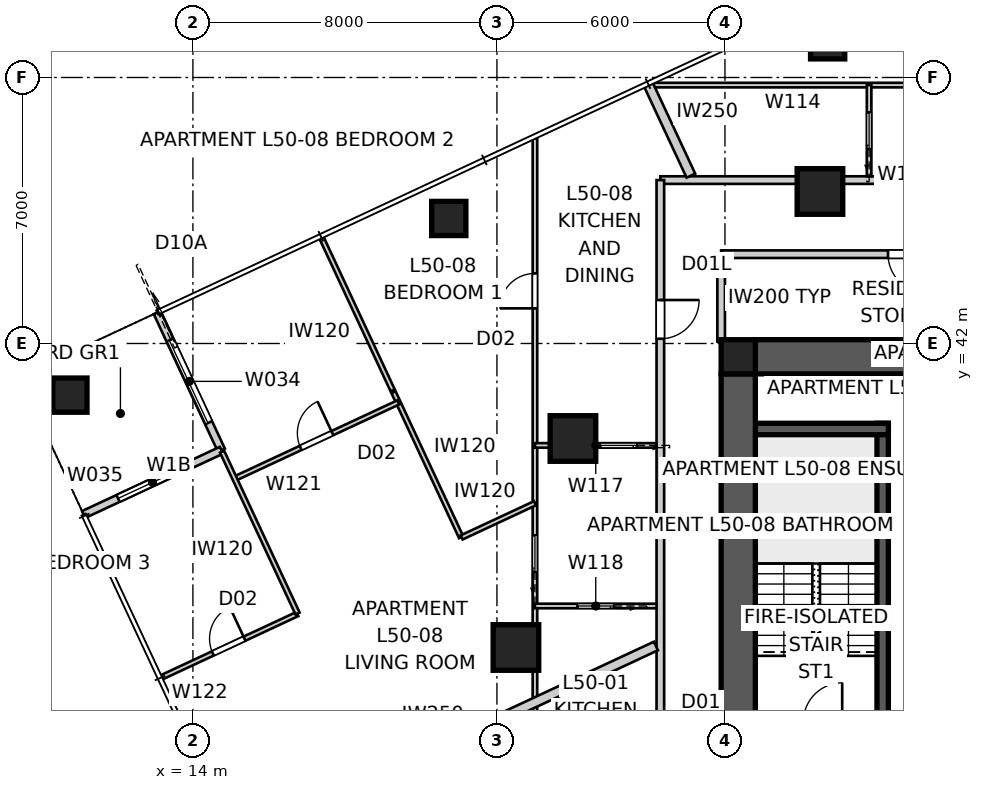
"""IFC4 building model, lengths in metres.
Left out: names, types, materials, properties, quantities, classifications, styles, units other than length and angle.
Written with IfcOpenShell. Run it as: python <this file> out.ifc"""

import sys

from ifc_helpers import new_model, si_unit, direction, frame, frame_2d, origin, origin_2d, place, context, subcontext, project, spatial, polyline, rectangle, outline, extrude, element, fill, save


model = new_model("IFC4")
c1 = context("Model", 3, precision=1e-05, world=origin(), true_north=direction((0.0, 1.0)))
c2 = subcontext(c1, "Body", "Model", "MODEL_VIEW")
j1 = project(units=[si_unit("LENGTHUNIT", "METRE"), si_unit("PLANEANGLEUNIT", "RADIAN")], contexts=[c1])
p1 = place(None, origin())
s1 = spatial("IfcSite", under=j1, at=p1, CompositionType="ELEMENT")
p2 = place(p1, origin())
s2 = spatial("IfcBuilding", under=s1, at=p2, CompositionType="ELEMENT")
p3 = place(p2, frame((0.0, 0.0, 182.8)))
s3 = spatial("IfcBuildingStorey", under=s2, at=p3, CompositionType="ELEMENT", Elevation=182.8)
p4 = place(p3, frame((28.8, 41.65, 0.0), z_axis=(0.0, 0.0, 1.0), x_axis=(1.0, 0.0, 0.0)))
e1 = element("IfcWall", 1, at=p4, inside=s3, PredefinedType="SHEAR", context=c2, shape_type="SweptSolid", body=[
    extrude(outline(polyline([(0.0, -0.45), (22.4, -0.45), (22.4, -0.025), (22.85, -0.025), (22.85, 0.025), (22.4, 0.025), (22.4, 0.45), (0.0, 0.45), (0.0, 0.025), (-0.45, 0.025), (-0.45, -0.025), (0.0, -0.025), (0.0, -0.45)])), origin(), (0.0, 0.0, 1.0), 3.4),
])
p5 = place(p3, frame((28.35, 41.2, 0.0), z_axis=(0.0, 0.0, 1.0), x_axis=(0.0, -1.0, 0.0)))
e2 = element("IfcWall", 2, at=p5, inside=s3, PredefinedType="SHEAR", context=c2, shape_type="SweptSolid", body=[
    extrude(outline(polyline([(0.0, -0.45), (22.4, -0.45), (22.4, -0.025), (22.85, -0.025), (22.85, 0.025), (22.4, 0.025), (22.4, 0.45), (0.0, 0.45), (0.0, 0.025), (-0.45, 0.025), (-0.45, -0.025), (0.0, -0.025), (0.0, -0.45)])), origin(), (0.0, 0.0, 1.0), 3.4),
])
p6 = place(p5, frame((11.14, 0.0, 0.0)))
e3 = element("IfcOpeningElement", 3, at=p6, cuts=e2, PredefinedType="OPENING", context=c2, shape_type="SweptSolid", body=[
    extrude(rectangle(XDim=1.02, YDim=2.4, at=frame_2d((0.51, 1.2))), frame((0.0, 0.46, 0.0), z_axis=(0.0, -1.0, 0.0), x_axis=(1.0, 0.0, 0.0)), (0.0, 0.0, 1.0), 0.92),
])
p7 = place(p3, frame((32.15, 32.2, 0.0), z_axis=(0.0, 0.0, 1.0), x_axis=(0.0, 1.0, 0.0)))
e4 = element("IfcWall", 4, at=p7, inside=s3, PredefinedType="SHEAR", context=c2, shape_type="SweptSolid", body=[
    extrude(rectangle(XDim=7.7, YDim=0.3, at=frame_2d((3.85, 0.0))), origin(), (0.0, 0.0, 1.0), 3.4),
])
p8 = place(p3, frame((28.8, 39.75, 0.0), z_axis=(0.0, 0.0, 1.0), x_axis=(1.0, 0.0, 0.0)))
e5 = element("IfcWall", 5, at=p8, inside=s3, PredefinedType="SHEAR", context=c2, shape_type="SweptSolid", body=[
    extrude(rectangle(XDim=3.5, YDim=0.3, at=frame_2d((1.75, 0.0))), origin(), (0.0, 0.0, 1.0), 3.4),
])
for number, where, z_axis, x_axis in (
    (6, (28.35, 41.65, 0.0), (0.0, 0.0, 1.0), (1.0, 0.0, 0.0)),
    (7, (30.702, 49.939, 0.0), (0.0, 0.0, 1.0), (1.0, 0.0, 0.0)),
    (8, (20.733, 45.29, 0.0), (0.0, 0.0, 1.0), (1.0, 0.0, 0.0)),
    (9, (10.764, 40.641, 0.0), (0.0, 0.0, 1.0), (1.0, 0.0, 0.0)),
):
    element("IfcColumn", number, at=place(p3, frame(where, z_axis=z_axis, x_axis=x_axis)), inside=s3, PredefinedType="COLUMN", context=c2, shape_type="SweptSolid", body=[
        extrude(rectangle(XDim=0.9, YDim=0.9, at=origin_2d()), origin(), (0.0, 0.0, 1.0), 3.4),
    ])
for number, where, z_axis, x_axis in (
    (10, (30.5, 46.0, 0.0), (0.0, 0.0, 1.0), (1.0, 0.0, 0.0)),
    (11, (24.0, 39.5, 0.0), (0.0, 0.0, 1.0), (1.0, 0.0, 0.0)),
    (12, (22.5, 34.0, 0.0), (0.0, 0.0, 1.0), (1.0, 0.0, 0.0)),
):
    element("IfcColumn", number, at=place(p3, frame(where, z_axis=z_axis, x_axis=x_axis)), inside=s3, PredefinedType="COLUMN", context=c2, shape_type="SweptSolid", body=[
        extrude(rectangle(XDim=1.2, YDim=1.2, at=origin_2d()), origin(), (0.0, 0.0, 1.0), 3.4),
    ])
p9 = place(p3, frame((13.06, 42.815, 0.0), z_axis=(0.0, 0.0, 1.0), x_axis=(0.422658246362, -0.906289140828, 0.0)))
e13 = element("IfcWall", 13, at=p9, inside=s3, PredefinedType="SOLIDWALL", context=c2, shape_type="SweptSolid", body=[
    extrude(rectangle(XDim=4.0, YDim=0.2, at=frame_2d((2.0, 0.0))), origin(), (0.0, 0.0, 1.0), 3.25),
])
p10 = place(p9, frame((0.8, 0.0, 0.0)))
e14 = element("IfcOpeningElement", 14, at=p10, cuts=e13, PredefinedType="OPENING", context=c2, shape_type="SweptSolid", body=[
    extrude(rectangle(XDim=2.4, YDim=2.1, at=frame_2d((1.2, 1.05))), frame((0.0, 0.11, 0.0), z_axis=(0.0, -1.0, 0.0), x_axis=(1.0, 0.0, 0.0)), (0.0, 0.0, 1.0), 0.22),
])
p11 = place(p3, frame((14.75, 39.19, 0.0), z_axis=(0.0, 0.0, 1.0), x_axis=(-0.906289140828, -0.422658246362, 0.0)))
e15 = element("IfcWall", 15, at=p11, inside=s3, PredefinedType="SOLIDWALL", context=c2, shape_type="SweptSolid", body=[
    extrude(rectangle(XDim=4.0, YDim=0.2, at=frame_2d((2.0, 0.0))), origin(), (0.0, 0.0, 1.0), 3.25),
])
p12 = place(p11, frame((1.0, 0.0, 0.45)))
e16 = element("IfcOpeningElement", 16, at=p12, cuts=e15, PredefinedType="OPENING", context=c2, shape_type="SweptSolid", body=[
    extrude(rectangle(XDim=2.0, YDim=1.8, at=frame_2d((1.0, 0.9))), frame((0.0, 0.11, 0.0), z_axis=(0.0, -1.0, 0.0), x_axis=(1.0, 0.0, 0.0)), (0.0, 0.0, 1.0), 0.22),
])
p13 = place(p3, frame((47.558, 46.3, 0.0), z_axis=(0.0, 0.0, 1.0), x_axis=(-1.0, 0.0, 0.0)))
e17 = element("IfcWall", 17, at=p13, inside=s3, PredefinedType="PARTITIONING", context=c2, shape_type="SweptSolid", body=[
    extrude(rectangle(XDim=15.117, YDim=0.2, at=frame_2d((7.558, 0.0))), origin(), (0.0, 0.0, 1.0), 3.25),
])
p14 = place(p13, frame((12.295, 0.0, 0.0)))
e18 = element("IfcOpeningElement", 18, at=p14, cuts=e17, PredefinedType="OPENING", context=c2, shape_type="SweptSolid", body=[
    extrude(rectangle(XDim=1.02, YDim=2.34, at=frame_2d((0.51, 1.17))), frame((0.0, 0.11, 0.0), z_axis=(0.0, -1.0, 0.0), x_axis=(1.0, 0.0, 0.0)), (0.0, 0.0, 1.0), 0.22),
])
p15 = place(p3, frame((32.442, 46.3, 0.0), z_axis=(0.0, 0.0, 1.0), x_axis=(-1.0, 0.0, 0.0)))
e19 = element("IfcWall", 19, at=p15, inside=s3, PredefinedType="PARTITIONING", context=c2, shape_type="SweptSolid", body=[
    extrude(rectangle(XDim=1.683, YDim=0.2, at=frame_2d((0.842, 0.0))), origin(), (0.0, 0.0, 1.0), 2.55),
])
p16 = place(p3, frame((30.758, 46.3, 0.0), z_axis=(0.0, 0.0, 1.0), x_axis=(-1.0, 0.0, 0.0)))
e20 = element("IfcWall", 20, at=p16, inside=s3, PredefinedType="PARTITIONING", context=c2, shape_type="SweptSolid", body=[
    extrude(rectangle(XDim=4.458, YDim=0.2, at=frame_2d((2.229, 0.0))), origin(), (0.0, 0.0, 1.0), 3.25),
])
p17 = place(p3, frame((26.3, 46.3, 0.0), z_axis=(0.0, 0.0, 1.0), x_axis=(0.0, -1.0, 0.0)))
e21 = element("IfcWall", 21, at=p17, inside=s3, PredefinedType="PARTITIONING", context=c2, shape_type="SweptSolid", body=[
    extrude(rectangle(XDim=32.6, YDim=0.2, at=frame_2d((16.3, 0.0))), origin(), (0.0, 0.0, 1.0), 3.25),
])
p18 = place(p17, frame((3.156, 0.0, 0.0)))
e22 = element("IfcOpeningElement", 22, at=p18, cuts=e21, PredefinedType="OPENING", context=c2, shape_type="SweptSolid", body=[
    extrude(rectangle(XDim=1.02, YDim=2.1, at=frame_2d((0.51, 1.05))), frame((0.0, 0.11, 0.0), z_axis=(0.0, -1.0, 0.0), x_axis=(1.0, 0.0, 0.0)), (0.0, 0.0, 1.0), 0.22),
])
p19 = place(p17, frame((14.68, 0.0, 0.0)))
e23 = element("IfcOpeningElement", 23, at=p19, cuts=e21, PredefinedType="OPENING", context=c2, shape_type="SweptSolid", body=[
    extrude(rectangle(XDim=1.02, YDim=2.34, at=frame_2d((0.51, 1.17))), frame((0.0, 0.11, 0.0), z_axis=(0.0, -1.0, 0.0), x_axis=(1.0, 0.0, 0.0)), (0.0, 0.0, 1.0), 0.22),
])
p20 = place(p17, frame((29.543, 0.0, 0.0)))
e24 = element("IfcOpeningElement", 24, at=p20, cuts=e21, PredefinedType="OPENING", context=c2, shape_type="SweptSolid", body=[
    extrude(rectangle(XDim=1.02, YDim=2.34, at=frame_2d((0.51, 1.17))), frame((0.0, 0.11, 0.0), z_axis=(0.0, -1.0, 0.0), x_axis=(1.0, 0.0, 0.0)), (0.0, 0.0, 1.0), 0.22),
])
p21 = place(p3, frame((25.975, 48.838, 0.0), z_axis=(0.0, 0.0, 1.0), x_axis=(0.422590257842, -0.906320844943, 0.0)))
e25 = element("IfcWall", 25, at=p21, inside=s3, PredefinedType="PARTITIONING", context=c2, shape_type="SweptSolid", body=[
    extrude(rectangle(XDim=2.671, YDim=0.25, at=frame_2d((1.336, 0.0))), origin(), (0.0, 0.0, 1.0), 3.25),
])
p22 = place(p3, frame((15.14, 28.89, 0.0), z_axis=(0.0, 0.0, 1.0), x_axis=(0.906303906082, 0.422626584374, 0.0)))
e26 = element("IfcWall", 26, at=p22, inside=s3, PredefinedType="PARTITIONING", context=c2, shape_type="SweptSolid", body=[
    extrude(rectangle(XDim=12.185, YDim=0.25, at=frame_2d((6.092, 0.0))), origin(), (0.0, 0.0, 1.0), 3.25),
])
p23 = place(p3, frame((52.1, 44.35, 0.0), z_axis=(0.0, 0.0, 1.0), x_axis=(-1.0, 0.0, 0.0)))
e27 = element("IfcWall", 27, at=p23, inside=s3, PredefinedType="PARTITIONING", context=c2, shape_type="SweptSolid", body=[
    extrude(rectangle(XDim=24.2, YDim=0.2, at=frame_2d((12.1, 0.0))), origin(), (0.0, 0.0, 1.0), 3.25),
])
p24 = place(p23, frame((18.789, 0.0, 0.0)))
e28 = element("IfcOpeningElement", 28, at=p24, cuts=e27, PredefinedType="OPENING", context=c2, shape_type="SweptSolid", body=[
    extrude(rectangle(XDim=1.02, YDim=2.1, at=frame_2d((0.51, 1.05))), frame((0.0, 0.11, 0.0), z_axis=(0.0, -1.0, 0.0), x_axis=(1.0, 0.0, 0.0)), (0.0, 0.0, 1.0), 0.22),
])
p25 = place(p23, frame((4.391, 0.0, 0.0)))
e29 = element("IfcOpeningElement", 29, at=p25, cuts=e27, PredefinedType="OPENING", context=c2, shape_type="SweptSolid", body=[
    extrude(rectangle(XDim=1.02, YDim=2.1, at=frame_2d((0.51, 1.05))), frame((0.0, 0.11, 0.0), z_axis=(0.0, -1.0, 0.0), x_axis=(1.0, 0.0, 0.0)), (0.0, 0.0, 1.0), 0.22),
])
p26 = place(p23, frame((11.59, 0.0, 0.0)))
e30 = element("IfcOpeningElement", 30, at=p26, cuts=e27, PredefinedType="OPENING", context=c2, shape_type="SweptSolid", body=[
    extrude(rectangle(XDim=1.02, YDim=2.1, at=frame_2d((0.51, 1.05))), frame((0.0, 0.11, 0.0), z_axis=(0.0, -1.0, 0.0), x_axis=(1.0, 0.0, 0.0)), (0.0, 0.0, 1.0), 0.22),
])
p27 = place(p3, frame((27.9, 44.35, 0.0), z_axis=(0.0, 0.0, 1.0), x_axis=(0.0, -1.0, 0.0)))
e31 = element("IfcWall", 31, at=p27, inside=s3, PredefinedType="PARTITIONING", context=c2, shape_type="SweptSolid", body=[
    extrude(rectangle(XDim=2.3, YDim=0.2, at=frame_2d((1.15, 0.0))), origin(), (0.0, 0.0, 1.0), 3.25),
])
p28 = place(p3, frame((23.0, 16.832, 0.0), z_axis=(0.0, 0.0, 1.0), x_axis=(0.0, 1.0, 0.0)))
e32 = element("IfcWall", 32, at=p28, inside=s3, PredefinedType="PARTITIONING", context=c2, shape_type="SweptSolid", body=[
    extrude(rectangle(XDim=30.574, YDim=0.12, at=frame_2d((15.287, 0.0))), origin(), (0.0, 0.0, 1.0), 2.55),
])
p29 = place(p28, frame((26.093, 0.0, 0.0)))
e33 = element("IfcOpeningElement", 33, at=p29, cuts=e32, PredefinedType="OPENING", context=c2, shape_type="SweptSolid", body=[
    extrude(rectangle(XDim=0.92, YDim=2.34, at=frame_2d((0.46, 1.17))), frame((0.0, 0.07, 0.0), z_axis=(0.0, -1.0, 0.0), x_axis=(1.0, 0.0, 0.0)), (0.0, 0.0, 1.0), 0.14),
])
p30 = place(p28, frame((13.012, 0.0, 0.0)))
e34 = element("IfcOpeningElement", 34, at=p30, cuts=e32, PredefinedType="OPENING", context=c2, shape_type="SweptSolid", body=[
    extrude(rectangle(XDim=0.92, YDim=2.34, at=frame_2d((0.46, 1.17))), frame((0.0, 0.07, 0.0), z_axis=(0.0, -1.0, 0.0), x_axis=(1.0, 0.0, 0.0)), (0.0, 0.0, 1.0), 0.14),
])
p31 = place(p28, frame((19.16, 0.0, 0.0)))
e35 = element("IfcOpeningElement", 35, at=p31, cuts=e32, PredefinedType="OPENING", context=c2, shape_type="SweptSolid", body=[
    extrude(rectangle(XDim=0.96, YDim=2.1, at=frame_2d((0.48, 1.05))), frame((0.0, 0.07, 0.0), z_axis=(0.0, -1.0, 0.0), x_axis=(1.0, 0.0, 0.0)), (0.0, 0.0, 1.0), 0.14),
])
p32 = place(p28, frame((2.018, 0.0, 0.0)))
e36 = element("IfcOpeningElement", 36, at=p32, cuts=e32, PredefinedType="OPENING", context=c2, shape_type="SweptSolid", body=[
    extrude(rectangle(XDim=0.96, YDim=2.1, at=frame_2d((0.48, 1.05))), frame((0.0, 0.07, 0.0), z_axis=(0.0, -1.0, 0.0), x_axis=(1.0, 0.0, 0.0)), (0.0, 0.0, 1.0), 0.14),
])
p33 = place(p3, frame((25.993, 48.8, 0.0), z_axis=(0.0, 0.0, 1.0), x_axis=(1.0, 0.0, 0.0)))
e37 = element("IfcWall", 37, at=p33, inside=s3, PredefinedType="PARTITIONING", context=c2, shape_type="SweptSolid", body=[
    extrude(rectangle(XDim=10.272, YDim=0.12, at=frame_2d((5.136, 0.0))), origin(), (0.0, 0.0, 1.0), 3.25),
])
p34 = place(p33, frame((7.576, 0.0, 0.0)))
e38 = element("IfcOpeningElement", 38, at=p34, cuts=e37, PredefinedType="OPENING", context=c2, shape_type="SweptSolid", body=[
    extrude(rectangle(XDim=0.92, YDim=2.34, at=frame_2d((0.46, 1.17))), frame((0.0, 0.07, 0.0), z_axis=(0.0, -1.0, 0.0), x_axis=(1.0, 0.0, 0.0)), (0.0, 0.0, 1.0), 0.14),
])
p35 = place(p3, frame((31.793, 46.4, 0.0), z_axis=(0.0, 0.0, 1.0), x_axis=(0.0, 1.0, 0.0)))
e39 = element("IfcWall", 39, at=p35, inside=s3, PredefinedType="PARTITIONING", context=c2, shape_type="SweptSolid", body=[
    extrude(rectangle(XDim=2.4, YDim=0.12, at=frame_2d((1.2, 0.0))), origin(), (0.0, 0.0, 1.0), 3.25),
])
p36 = place(p35, frame((0.72, 0.0, 0.0)))
e40 = element("IfcOpeningElement", 40, at=p36, cuts=e39, PredefinedType="OPENING", context=c2, shape_type="SweptSolid", body=[
    extrude(rectangle(XDim=0.96, YDim=2.1, at=frame_2d((0.48, 1.05))), frame((0.0, 0.07, 0.0), z_axis=(0.0, -1.0, 0.0), x_axis=(1.0, 0.0, 0.0)), (0.0, 0.0, 1.0), 0.14),
])
p37 = place(p3, frame((26.2, 39.318, 0.0), z_axis=(0.0, 0.0, 1.0), x_axis=(-1.0, 0.0, 0.0)))
e41 = element("IfcWall", 41, at=p37, inside=s3, PredefinedType="PARTITIONING", context=c2, shape_type="SweptSolid", body=[
    extrude(rectangle(XDim=3.2, YDim=0.12, at=frame_2d((1.6, 0.0))), origin(), (0.0, 0.0, 1.0), 3.25),
])
p38 = place(p37, frame((0.52, 0.0, 0.0)))
e42 = element("IfcOpeningElement", 42, at=p38, cuts=e41, PredefinedType="OPENING", context=c2, shape_type="SweptSolid", body=[
    extrude(rectangle(XDim=0.96, YDim=2.1, at=frame_2d((0.48, 1.05))), frame((0.0, 0.07, 0.0), z_axis=(0.0, -1.0, 0.0), x_axis=(1.0, 0.0, 0.0)), (0.0, 0.0, 1.0), 0.14),
])
p39 = place(p3, frame((26.2, 35.092, 0.0), z_axis=(0.0, 0.0, 1.0), x_axis=(-1.0, 0.0, 0.0)))
e43 = element("IfcWall", 43, at=p39, inside=s3, PredefinedType="PARTITIONING", context=c2, shape_type="SweptSolid", body=[
    extrude(rectangle(XDim=3.2, YDim=0.12, at=frame_2d((1.6, 0.0))), origin(), (0.0, 0.0, 1.0), 3.25),
])
p40 = place(p39, frame((1.12, 0.0, 0.0)))
e44 = element("IfcOpeningElement", 44, at=p40, cuts=e43, PredefinedType="OPENING", context=c2, shape_type="SweptSolid", body=[
    extrude(rectangle(XDim=0.96, YDim=2.1, at=frame_2d((0.48, 1.05))), frame((0.0, 0.07, 0.0), z_axis=(0.0, -1.0, 0.0), x_axis=(1.0, 0.0, 0.0)), (0.0, 0.0, 1.0), 0.14),
])
p41 = place(p3, frame((19.279, 40.718, 0.0), z_axis=(0.0, 0.0, 1.0), x_axis=(0.422625167194, -0.906304566939, 0.0)))
e45 = element("IfcWall", 45, at=p41, inside=s3, PredefinedType="PARTITIONING", context=c2, shape_type="SweptSolid", body=[
    extrude(rectangle(XDim=4.211, YDim=0.12, at=frame_2d((2.105, 0.0))), origin(), (0.0, 0.0, 1.0), 3.25),
])
p42 = place(p3, frame((21.072, 36.897, 0.0), z_axis=(0.0, 0.0, 1.0), x_axis=(0.90630329877, 0.422627886727, 0.0)))
e46 = element("IfcWall", 46, at=p42, inside=s3, PredefinedType="PARTITIONING", context=c2, shape_type="SweptSolid", body=[
    extrude(rectangle(XDim=2.128, YDim=0.12, at=frame_2d((1.064, 0.0))), origin(), (0.0, 0.0, 1.0), 3.25),
])
p43 = place(p3, frame((15.099, 38.442, 0.0), z_axis=(0.0, 0.0, 1.0), x_axis=(0.906306539388, 0.422620937321, 0.0)))
e47 = element("IfcWall", 47, at=p43, inside=s3, PredefinedType="PARTITIONING", context=c2, shape_type="SweptSolid", body=[
    extrude(rectangle(XDim=4.75, YDim=0.12, at=frame_2d((2.375, 0.0))), origin(), (0.0, 0.0, 1.0), 3.25),
])
p44 = place(p43, frame((1.915, 0.0, 0.0)))
e48 = element("IfcOpeningElement", 48, at=p44, cuts=e47, PredefinedType="OPENING", context=c2, shape_type="SweptSolid", body=[
    extrude(rectangle(XDim=0.92, YDim=2.34, at=frame_2d((0.46, 1.17))), frame((0.0, 0.07, 0.0), z_axis=(0.0, -1.0, 0.0), x_axis=(1.0, 0.0, 0.0)), (0.0, 0.0, 1.0), 0.14),
])
p45 = place(p3, frame((13.169, 33.211, 0.0), z_axis=(0.0, 0.0, 1.0), x_axis=(0.9062952203, 0.422645210149, 0.0)))
e49 = element("IfcWall", 49, at=p45, inside=s3, PredefinedType="PARTITIONING", context=c2, shape_type="SweptSolid", body=[
    extrude(rectangle(XDim=3.95, YDim=0.12, at=frame_2d((1.975, 0.0))), origin(), (0.0, 0.0, 1.0), 3.25),
])
p46 = place(p45, frame((1.495, 0.0, 0.0)))
e50 = element("IfcOpeningElement", 50, at=p46, cuts=e49, PredefinedType="OPENING", context=c2, shape_type="SweptSolid", body=[
    extrude(rectangle(XDim=0.92, YDim=2.34, at=frame_2d((0.46, 1.17))), frame((0.0, 0.07, 0.0), z_axis=(0.0, -1.0, 0.0), x_axis=(1.0, 0.0, 0.0)), (0.0, 0.0, 1.0), 0.14),
])
p47 = place(p3, frame((16.754, 34.894, 0.0), z_axis=(0.0, 0.0, 1.0), x_axis=(-0.42256979057, 0.906330387937, 0.0)))
e51 = element("IfcWall", 51, at=p47, inside=s3, PredefinedType="PARTITIONING", context=c2, shape_type="SweptSolid", body=[
    extrude(rectangle(XDim=4.7, YDim=0.12, at=frame_2d((2.35, 0.0))), origin(), (0.0, 0.0, 1.0), 3.25),
])
p48 = place(p3, frame((19.256, 40.767, 0.0), z_axis=(0.0, 0.0, 1.0), x_axis=(-0.42260518136, 0.906313886403, 0.0)))
e52 = element("IfcWall", 52, at=p48, inside=s3, PredefinedType="PARTITIONING", context=c2, shape_type="SweptSolid", body=[
    extrude(rectangle(XDim=4.435, YDim=0.12, at=frame_2d((2.218, 0.0))), origin(), (0.0, 0.0, 1.0), 3.25),
])
p49 = place(p10, origin())
e53 = element("IfcDoor", 53, at=p49, inside=s3, OperationType="SLIDING_TO_LEFT", PredefinedType="DOOR", context=c2, shape_type="SweptSolid", body=[
    extrude(rectangle(XDim=2.4, YDim=2.1, at=frame_2d((1.2, 1.05))), frame((0.0, 0.025, 0.0), z_axis=(0.0, -1.0, 0.0), x_axis=(1.0, 0.0, 0.0)), (0.0, 0.0, 1.0), 0.05),
])
fill(e14, e53)
p50 = place(p12, origin())
e54 = element("IfcWindow", 54, at=p50, inside=s3, PartitioningType="SINGLE_PANEL", PredefinedType="WINDOW", context=c2, shape_type="SweptSolid", body=[
    extrude(rectangle(XDim=2.0, YDim=1.8, at=frame_2d((1.0, 0.9))), frame((0.0, 0.03, 0.0), z_axis=(0.0, -1.0, 0.0), x_axis=(1.0, 0.0, 0.0)), (0.0, 0.0, 1.0), 0.06),
])
fill(e16, e54)
p51 = place(p24, origin())
e55 = element("IfcDoor", 55, at=p51, inside=s3, OperationType="SINGLE_SWING_LEFT", PredefinedType="DOOR", context=c2, shape_type="SweptSolid", body=[
    extrude(rectangle(XDim=1.02, YDim=2.1, at=frame_2d((0.51, 1.05))), frame((0.0, 0.025, 0.0), z_axis=(0.0, -1.0, 0.0), x_axis=(1.0, 0.0, 0.0)), (0.0, 0.0, 1.0), 0.05),
])
fill(e28, e55)
p52 = place(p18, origin())
e56 = element("IfcDoor", 56, at=p52, inside=s3, OperationType="SINGLE_SWING_LEFT", PredefinedType="DOOR", context=c2, shape_type="SweptSolid", body=[
    extrude(rectangle(XDim=1.02, YDim=2.1, at=frame_2d((0.51, 1.05))), frame((0.0, 0.025, 0.0), z_axis=(0.0, -1.0, 0.0), x_axis=(1.0, 0.0, 0.0)), (0.0, 0.0, 1.0), 0.05),
])
fill(e22, e56)
p53 = place(p29, origin())
e57 = element("IfcDoor", 57, at=p53, inside=s3, OperationType="SINGLE_SWING_LEFT", PredefinedType="DOOR", context=c2, shape_type="SweptSolid", body=[
    extrude(rectangle(XDim=0.92, YDim=2.34, at=frame_2d((0.46, 1.17))), frame((0.0, 0.025, 0.0), z_axis=(0.0, -1.0, 0.0), x_axis=(1.0, 0.0, 0.0)), (0.0, 0.0, 1.0), 0.05),
])
fill(e33, e57)
p54 = place(p38, origin())
e58 = element("IfcDoor", 58, at=p54, inside=s3, OperationType="SLIDING_TO_LEFT", PredefinedType="DOOR", context=c2, shape_type="SweptSolid", body=[
    extrude(rectangle(XDim=0.96, YDim=2.1, at=frame_2d((0.48, 1.05))), frame((0.0, 0.025, 0.0), z_axis=(0.0, -1.0, 0.0), x_axis=(1.0, 0.0, 0.0)), (0.0, 0.0, 1.0), 0.05),
])
fill(e42, e58)
p55 = place(p36, origin())
e59 = element("IfcDoor", 59, at=p55, inside=s3, OperationType="SLIDING_TO_LEFT", PredefinedType="DOOR", context=c2, shape_type="SweptSolid", body=[
    extrude(rectangle(XDim=0.96, YDim=2.1, at=frame_2d((0.48, 1.05))), frame((0.0, 0.025, 0.0), z_axis=(0.0, -1.0, 0.0), x_axis=(1.0, 0.0, 0.0)), (0.0, 0.0, 1.0), 0.05),
])
fill(e40, e59)
p56 = place(p40, origin())
e60 = element("IfcDoor", 60, at=p56, inside=s3, OperationType="SLIDING_TO_LEFT", PredefinedType="DOOR", context=c2, shape_type="SweptSolid", body=[
    extrude(rectangle(XDim=0.96, YDim=2.1, at=frame_2d((0.48, 1.05))), frame((0.0, 0.025, 0.0), z_axis=(0.0, -1.0, 0.0), x_axis=(1.0, 0.0, 0.0)), (0.0, 0.0, 1.0), 0.05),
])
fill(e44, e60)
p57 = place(p31, origin())
e61 = element("IfcDoor", 61, at=p57, inside=s3, OperationType="SLIDING_TO_LEFT", PredefinedType="DOOR", context=c2, shape_type="SweptSolid", body=[
    extrude(rectangle(XDim=0.96, YDim=2.1, at=frame_2d((0.48, 1.05))), frame((0.0, 0.025, 0.0), z_axis=(0.0, -1.0, 0.0), x_axis=(1.0, 0.0, 0.0)), (0.0, 0.0, 1.0), 0.05),
])
fill(e35, e61)
p58 = place(p44, origin())
e62 = element("IfcDoor", 62, at=p58, inside=s3, OperationType="SINGLE_SWING_RIGHT", PredefinedType="DOOR", context=c2, shape_type="SweptSolid", body=[
    extrude(rectangle(XDim=0.92, YDim=2.34, at=frame_2d((0.46, 1.17))), frame((0.0, 0.025, 0.0), z_axis=(0.0, -1.0, 0.0), x_axis=(1.0, 0.0, 0.0)), (0.0, 0.0, 1.0), 0.05),
])
fill(e48, e62)
p59 = place(p46, origin())
e63 = element("IfcDoor", 63, at=p59, inside=s3, OperationType="SINGLE_SWING_RIGHT", PredefinedType="DOOR", context=c2, shape_type="SweptSolid", body=[
    extrude(rectangle(XDim=0.92, YDim=2.34, at=frame_2d((0.46, 1.17))), frame((0.0, 0.025, 0.0), z_axis=(0.0, -1.0, 0.0), x_axis=(1.0, 0.0, 0.0)), (0.0, 0.0, 1.0), 0.05),
])
fill(e50, e63)
save(model, sys.argv[1])
